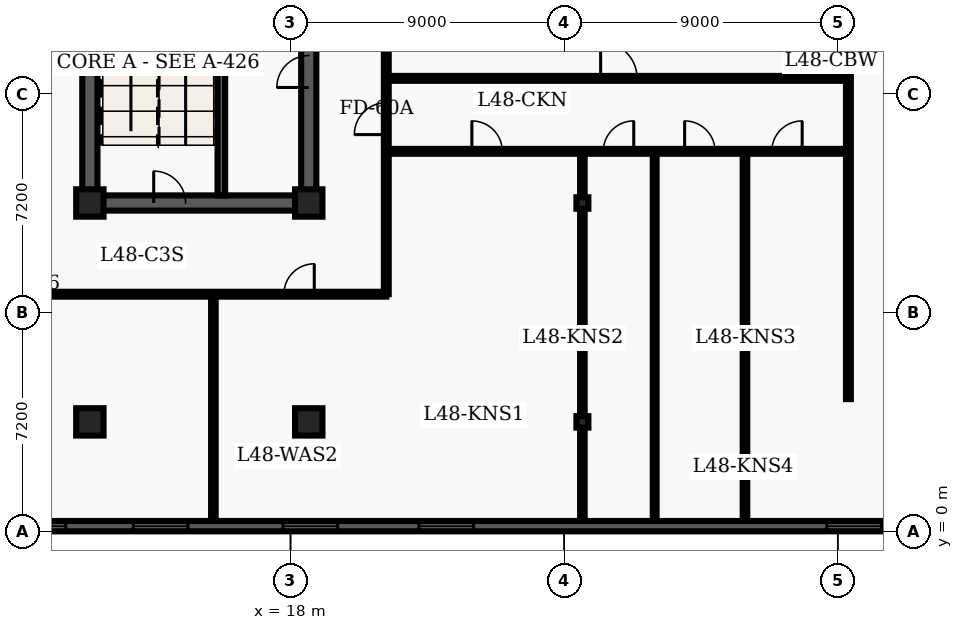
"""IFC4 building model, lengths in metres.
Left out: names, types, materials, properties, quantities, classifications, styles, units other than length and angle.
Written with IfcOpenShell. Run it as: python <this file> out.ifc"""

import sys

from ifc_helpers import new_model, entity, si_unit, converted_unit, direction, frame, origin_with_axes, origin_2d_with_axis, place, context, subcontext, project, spatial, polyline, rectangle, i_section, outline, extrude, element, fill, save


model = new_model("IFC4")
c1 = context("Model", 3, precision=1e-05, world=origin_with_axes(), true_north=direction((0.0, 1.0)))
c2 = subcontext(c1, "Body", "Model", "MODEL_VIEW")
j1 = project(units=[si_unit("LENGTHUNIT", "METRE"), converted_unit("PLANEANGLEUNIT", "DEGREE", entity("IfcPlaneAngleMeasure", 0.017), si_unit("PLANEANGLEUNIT", "RADIAN"), dimensions=[0, 0, 0, 0, 0, 0, 0])], contexts=[c1])
p1 = place(None, origin_with_axes())
s1 = spatial("IfcSite", under=j1, at=p1, CompositionType="ELEMENT")
p2 = place(p1, origin_with_axes())
s2 = spatial("IfcBuilding", under=s1, at=p2, CompositionType="ELEMENT")
p3 = place(p2, frame((0.0, 0.0, 196.5), z_axis=(0.0, 0.0, 1.0), x_axis=(1.0, 0.0, 0.0)))
s3 = spatial("IfcBuildingStorey", under=s2, at=p3, CompositionType="ELEMENT", Elevation=196.5)
p4 = place(p3, frame((11.4, 10.8, 0.0), z_axis=(0.0, 0.0, 1.0), x_axis=(0.0, 1.0, 0.0)))
e1 = element("IfcWall", 1, at=p4, inside=s3, PredefinedType="SHEAR", context=c2, shape_type="SweptSolid", body=[
    extrude(outline(polyline([(0.0, -0.25), (27.0, -0.25), (27.0, 0.25), (0.0, 0.25), (0.0, -0.25)])), origin_with_axes(), (0.0, 0.0, 1.0), 3.66),
])
p5 = place(p3, frame((11.4, 10.8, 0.0), z_axis=(0.0, 0.0, 1.0), x_axis=(1.0, 0.0, 0.0)))
e2 = element("IfcWall", 2, at=p5, inside=s3, PredefinedType="SHEAR", context=c2, shape_type="SweptSolid", body=[
    extrude(outline(polyline([(0.0, -0.25), (7.2, -0.25), (7.2, 0.25), (0.0, 0.25), (0.0, -0.25)])), origin_with_axes(), (0.0, 0.0, 1.0), 3.66),
])
p6 = place(p5, frame((2.625, 0.0, 0.0), z_axis=(0.0, 0.0, 1.0), x_axis=(1.0, 0.0, 0.0)))
e3 = element("IfcOpeningElement", 3, at=p6, cuts=e2, PredefinedType="OPENING", context=c2, shape_type="SweptSolid", body=[
    extrude(rectangle(XDim=1.05, YDim=0.52, at=origin_2d_with_axis()), origin_with_axes(), (0.0, 0.0, 1.0), 2.15),
])
p7 = place(p3, frame((18.6, 10.8, 0.0), z_axis=(0.0, 0.0, 1.0), x_axis=(0.0, 1.0, 0.0)))
e4 = element("IfcWall", 4, at=p7, inside=s3, PredefinedType="SHEAR", context=c2, shape_type="SweptSolid", body=[
    extrude(outline(polyline([(0.0, -0.25), (13.5, -0.25), (13.5, 0.25), (0.0, 0.25), (0.0, -0.25)])), origin_with_axes(), (0.0, 0.0, 1.0), 3.66),
])
p8 = place(p7, frame((11.125, 0.0, 0.0), z_axis=(0.0, 0.0, 1.0), x_axis=(1.0, 0.0, 0.0)))
e5 = element("IfcOpeningElement", 5, at=p8, cuts=e4, PredefinedType="OPENING", context=c2, shape_type="SweptSolid", body=[
    extrude(rectangle(XDim=1.05, YDim=0.52, at=origin_2d_with_axis()), origin_with_axes(), (0.0, 0.0, 1.0), 2.15),
])
p9 = place(p7, frame((4.325, 0.0, 0.0), z_axis=(0.0, 0.0, 1.0), x_axis=(1.0, 0.0, 0.0)))
e6 = element("IfcOpeningElement", 6, at=p9, cuts=e4, PredefinedType="OPENING", context=c2, shape_type="SweptSolid", body=[
    extrude(rectangle(XDim=1.05, YDim=0.52, at=origin_2d_with_axis()), origin_with_axes(), (0.0, 0.0, 1.0), 2.15),
])
p10 = place(p3, frame((15.725, 11.05, 0.0), z_axis=(0.0, 0.0, 1.0), x_axis=(0.0, 1.0, 0.0)))
e7 = element("IfcWall", 7, at=p10, inside=s3, PredefinedType="SHEAR", context=c2, shape_type="SweptSolid", body=[
    extrude(outline(polyline([(0.0, -0.125), (8.65, -0.125), (8.65, 0.125), (0.0, 0.125), (0.0, -0.125)])), origin_with_axes(), (0.0, 0.0, 1.0), 3.66),
])
for number, where, z_axis, x_axis in (
    (8, (11.4, 3.6, 0.0), (0.0, 0.0, 1.0), (1.0, 0.0, 0.0)),
    (9, (11.4, 10.8, 0.0), (0.0, 0.0, 1.0), (1.0, 0.0, 0.0)),
    (10, (18.6, 3.6, 0.0), (0.0, 0.0, 1.0), (1.0, 0.0, 0.0)),
    (11, (18.6, 10.8, 0.0), (0.0, 0.0, 1.0), (1.0, 0.0, 0.0)),
):
    element("IfcColumn", number, at=place(p3, frame(where, z_axis=z_axis, x_axis=x_axis)), inside=s3, PredefinedType="COLUMN", context=c2, shape_type="SweptSolid", body=[
        extrude(rectangle(XDim=0.9, YDim=0.9, at=origin_2d_with_axis()), origin_with_axes(), (0.0, 0.0, 1.0), 3.9),
    ])
for number, where, z_axis, x_axis in (
    (12, (27.6, 3.6, 0.0), (0.0, 0.0, 1.0), (1.0, 0.0, 0.0)),
    (13, (27.6, 10.8, 0.0), (0.0, 0.0, 1.0), (1.0, 0.0, 0.0)),
):
    element("IfcColumn", number, at=place(p3, frame(where, z_axis=z_axis, x_axis=x_axis)), inside=s3, PredefinedType="COLUMN", context=c2, shape_type="SweptSolid", body=[
        extrude(i_section(OverallWidth=0.394, OverallDepth=0.375, WebThickness=0.017, FlangeThickness=0.028, FilletRadius=0.02, at=origin_2d_with_axis()), origin_with_axes(), (0.0, 0.0, 1.0), 3.9),
    ])
p11 = place(p3, frame((2.6, 7.8, 0.0), z_axis=(0.0, 0.0, 1.0), x_axis=(1.0, 0.0, 0.0)))
e14 = element("IfcWall", 14, at=p11, inside=s3, PredefinedType="PARTITIONING", context=c2, shape_type="SweptSolid", body=[
    extrude(outline(polyline([(0.0, -0.08), (18.55, -0.08), (18.55, 0.08), (0.0, 0.08), (0.0, -0.08)])), origin_with_axes(), (0.0, 0.0, 1.0), 2.7),
])
p12 = place(p11, frame((6.426, 0.0, 0.0), z_axis=(0.0, 0.0, 1.0), x_axis=(1.0, 0.0, 0.0)))
e15 = element("IfcOpeningElement", 15, at=p12, cuts=e14, PredefinedType="OPENING", context=c2, shape_type="SweptSolid", body=[
    extrude(rectangle(XDim=1.2, YDim=0.18, at=origin_2d_with_axis()), origin_with_axes(), (0.0, 0.0, 1.0), 2.2),
])
p13 = place(p11, frame((15.681, 0.0, 0.0), z_axis=(0.0, 0.0, 1.0), x_axis=(1.0, 0.0, 0.0)))
e16 = element("IfcOpeningElement", 16, at=p13, cuts=e14, PredefinedType="OPENING", context=c2, shape_type="SweptSolid", body=[
    extrude(rectangle(XDim=1.0, YDim=0.18, at=origin_2d_with_axis()), origin_with_axes(), (0.0, 0.0, 1.0), 2.15),
])
p14 = place(p3, frame((21.15, 7.8, 0.0), z_axis=(0.0, 0.0, 1.0), x_axis=(0.0, 1.0, 0.0)))
e17 = element("IfcWall", 17, at=p14, inside=s3, PredefinedType="PARTITIONING", context=c2, shape_type="SweptSolid", body=[
    extrude(outline(polyline([(0.0, -0.08), (32.7, -0.08), (32.7, 0.08), (0.0, 0.08), (0.0, -0.08)])), origin_with_axes(), (0.0, 0.0, 1.0), 2.7),
])
p15 = place(p14, frame((16.235, 0.0, 0.0), z_axis=(0.0, 0.0, 1.0), x_axis=(1.0, 0.0, 0.0)))
e18 = element("IfcOpeningElement", 18, at=p15, cuts=e17, PredefinedType="OPENING", context=c2, shape_type="SweptSolid", body=[
    extrude(rectangle(XDim=1.0, YDim=0.18, at=origin_2d_with_axis()), origin_with_axes(), (0.0, 0.0, 1.0), 2.15),
])
p16 = place(p14, frame((20.023, 0.0, 0.0), z_axis=(0.0, 0.0, 1.0), x_axis=(1.0, 0.0, 0.0)))
e19 = element("IfcOpeningElement", 19, at=p16, cuts=e17, PredefinedType="OPENING", context=c2, shape_type="SweptSolid", body=[
    extrude(rectangle(XDim=1.0, YDim=0.18, at=origin_2d_with_axis()), origin_with_axes(), (0.0, 0.0, 1.0), 2.15),
])
p17 = place(p14, frame((23.135, 0.0, 0.0), z_axis=(0.0, 0.0, 1.0), x_axis=(1.0, 0.0, 0.0)))
e20 = element("IfcOpeningElement", 20, at=p17, cuts=e17, PredefinedType="OPENING", context=c2, shape_type="SweptSolid", body=[
    extrude(rectangle(XDim=1.0, YDim=0.18, at=origin_2d_with_axis()), origin_with_axes(), (0.0, 0.0, 1.0), 2.15),
])
p18 = place(p14, frame((26.594, 0.0, 0.0), z_axis=(0.0, 0.0, 1.0), x_axis=(1.0, 0.0, 0.0)))
e21 = element("IfcOpeningElement", 21, at=p18, cuts=e17, PredefinedType="OPENING", context=c2, shape_type="SweptSolid", body=[
    extrude(rectangle(XDim=1.0, YDim=0.18, at=origin_2d_with_axis()), origin_with_axes(), (0.0, 0.0, 1.0), 2.15),
])
p19 = place(p14, frame((30.498, 0.0, 0.0), z_axis=(0.0, 0.0, 1.0), x_axis=(1.0, 0.0, 0.0)))
e22 = element("IfcOpeningElement", 22, at=p19, cuts=e17, PredefinedType="OPENING", context=c2, shape_type="SweptSolid", body=[
    extrude(rectangle(XDim=1.0, YDim=0.18, at=origin_2d_with_axis()), origin_with_axes(), (0.0, 0.0, 1.0), 2.15),
])
p20 = place(p14, frame((5.775, 0.0, 0.0), z_axis=(0.0, 0.0, 1.0), x_axis=(1.0, 0.0, 0.0)))
e23 = element("IfcOpeningElement", 23, at=p20, cuts=e17, PredefinedType="OPENING", context=c2, shape_type="SweptSolid", body=[
    extrude(rectangle(XDim=1.05, YDim=0.18, at=origin_2d_with_axis()), origin_with_axes(), (0.0, 0.0, 1.0), 2.15),
])
p21 = place(p3, frame((15.463, 0.335, 0.0), z_axis=(0.0, 0.0, 1.0), x_axis=(0.0, 1.0, 0.0)))
e24 = element("IfcWall", 24, at=p21, inside=s3, PredefinedType="PARTITIONING", context=c2, shape_type="SweptSolid", body=[
    extrude(outline(polyline([(0.0, -0.075), (7.365, -0.075), (7.365, 0.075), (0.0, 0.075), (0.0, -0.075)])), origin_with_axes(), (0.0, 0.0, 1.0), 2.7),
])
p22 = place(p3, frame((21.15, 12.5, 0.0), z_axis=(0.0, 0.0, 1.0), x_axis=(1.0, 0.0, 0.0)))
e25 = element("IfcWall", 25, at=p22, inside=s3, PredefinedType="PARTITIONING", context=c2, shape_type="SweptSolid", body=[
    extrude(outline(polyline([(0.0, -0.08), (15.2, -0.08), (15.2, 0.08), (0.0, 0.08), (0.0, -0.08)])), origin_with_axes(), (0.0, 0.0, 1.0), 2.7),
])
p23 = place(p22, frame((3.315, 0.0, 0.0), z_axis=(0.0, 0.0, 1.0), x_axis=(1.0, 0.0, 0.0)))
e26 = element("IfcOpeningElement", 26, at=p23, cuts=e25, PredefinedType="OPENING", context=c2, shape_type="SweptSolid", body=[
    extrude(rectangle(XDim=1.0, YDim=0.18, at=origin_2d_with_axis()), origin_with_axes(), (0.0, 0.0, 1.0), 2.15),
])
p24 = place(p22, frame((7.639, 0.0, 0.0), z_axis=(0.0, 0.0, 1.0), x_axis=(1.0, 0.0, 0.0)))
e27 = element("IfcOpeningElement", 27, at=p24, cuts=e25, PredefinedType="OPENING", context=c2, shape_type="SweptSolid", body=[
    extrude(rectangle(XDim=1.0, YDim=0.18, at=origin_2d_with_axis()), origin_with_axes(), (0.0, 0.0, 1.0), 2.15),
])
p25 = place(p22, frame((10.313, 0.0, 0.0), z_axis=(0.0, 0.0, 1.0), x_axis=(1.0, 0.0, 0.0)))
e28 = element("IfcOpeningElement", 28, at=p25, cuts=e25, PredefinedType="OPENING", context=c2, shape_type="SweptSolid", body=[
    extrude(rectangle(XDim=1.0, YDim=0.18, at=origin_2d_with_axis()), origin_with_axes(), (0.0, 0.0, 1.0), 2.15),
])
p26 = place(p22, frame((13.179, 0.0, 0.0), z_axis=(0.0, 0.0, 1.0), x_axis=(1.0, 0.0, 0.0)))
e29 = element("IfcOpeningElement", 29, at=p26, cuts=e25, PredefinedType="OPENING", context=c2, shape_type="SweptSolid", body=[
    extrude(rectangle(XDim=1.0, YDim=0.18, at=origin_2d_with_axis()), origin_with_axes(), (0.0, 0.0, 1.0), 2.15),
])
p27 = place(p3, frame((21.15, 14.9, 0.0), z_axis=(0.0, 0.0, 1.0), x_axis=(1.0, 0.0, 0.0)))
e30 = element("IfcWall", 30, at=p27, inside=s3, PredefinedType="PARTITIONING", context=c2, shape_type="SweptSolid", body=[
    extrude(outline(polyline([(0.0, -0.08), (15.2, -0.08), (15.2, 0.08), (0.0, 0.08), (0.0, -0.08)])), origin_with_axes(), (0.0, 0.0, 1.0), 2.7),
])
p28 = place(p27, frame((7.65, 0.0, 0.0), z_axis=(0.0, 0.0, 1.0), x_axis=(1.0, 0.0, 0.0)))
e31 = element("IfcOpeningElement", 31, at=p28, cuts=e30, PredefinedType="OPENING", context=c2, shape_type="SweptSolid", body=[
    extrude(rectangle(XDim=1.2, YDim=0.18, at=origin_2d_with_axis()), origin_with_axes(), (0.0, 0.0, 1.0), 2.2),
])
p29 = place(p3, frame((36.35, 4.35, 0.0), z_axis=(0.0, 0.0, 1.0), x_axis=(0.0, 1.0, 0.0)))
e32 = element("IfcWall", 32, at=p29, inside=s3, PredefinedType="PARTITIONING", context=c2, shape_type="SweptSolid", body=[
    extrude(outline(polyline([(0.0, -0.08), (16.95, -0.08), (16.95, 0.08), (0.0, 0.08), (0.0, -0.08)])), origin_with_axes(), (0.0, 0.0, 1.0), 2.7),
])
p30 = place(p3, frame((27.6, 0.335, 0.0), z_axis=(0.0, 0.0, 1.0), x_axis=(0.0, 1.0, 0.0)))
e33 = element("IfcWall", 33, at=p30, inside=s3, PredefinedType="PARTITIONING", context=c2, shape_type="SweptSolid", body=[
    extrude(outline(polyline([(0.0, -0.075), (12.045, -0.075), (12.045, 0.075), (0.0, 0.075), (0.0, -0.075)])), origin_with_axes(), (0.0, 0.0, 1.0), 2.7),
])
p31 = place(p3, frame((29.978, 0.335, 0.0), z_axis=(0.0, 0.0, 1.0), x_axis=(0.0, 1.0, 0.0)))
e34 = element("IfcWall", 34, at=p31, inside=s3, PredefinedType="PARTITIONING", context=c2, shape_type="SweptSolid", body=[
    extrude(outline(polyline([(0.0, -0.062), (12.045, -0.062), (12.045, 0.062), (0.0, 0.062), (0.0, -0.062)])), origin_with_axes(), (0.0, 0.0, 1.0), 2.7),
])
p32 = place(p3, frame((32.948, 0.335, 0.0), z_axis=(0.0, 0.0, 1.0), x_axis=(0.0, 1.0, 0.0)))
e35 = element("IfcWall", 35, at=p32, inside=s3, PredefinedType="PARTITIONING", context=c2, shape_type="SweptSolid", body=[
    extrude(outline(polyline([(0.0, -0.075), (12.045, -0.075), (12.045, 0.075), (0.0, 0.075), (0.0, -0.075)])), origin_with_axes(), (0.0, 0.0, 1.0), 2.7),
])
p33 = place(p3, frame((57.26, 0.17, 0.0), z_axis=(0.0, 0.0, 1.0), x_axis=(-1.0, 0.0, 0.0)))
e36 = element("IfcWall", 36, at=p33, inside=s3, PredefinedType="SOLIDWALL", context=c2, shape_type="SweptSolid", body=[
    extrude(outline(polyline([(0.0, -0.17), (54.86, -0.17), (54.86, 0.17), (0.0, 0.17), (0.0, -0.17)])), origin_with_axes(), (0.0, 0.0, 1.0), 3.66),
])
p34 = place(p33, frame((2.836, 0.0, 0.45), z_axis=(0.0, 0.0, 1.0), x_axis=(1.0, 0.0, 0.0)))
e37 = element("IfcOpeningElement", 37, at=p34, cuts=e36, PredefinedType="OPENING", context=c2, shape_type="SweptSolid", body=[
    extrude(rectangle(XDim=1.8, YDim=0.36, at=origin_2d_with_axis()), origin_with_axes(), (0.0, 0.0, 1.0), 2.1),
])
p35 = place(p33, frame((7.307, 0.0, 0.45), z_axis=(0.0, 0.0, 1.0), x_axis=(1.0, 0.0, 0.0)))
e38 = element("IfcOpeningElement", 38, at=p35, cuts=e36, PredefinedType="OPENING", context=c2, shape_type="SweptSolid", body=[
    extrude(rectangle(XDim=1.8, YDim=0.36, at=origin_2d_with_axis()), origin_with_axes(), (0.0, 0.0, 1.0), 2.1),
])
p36 = place(p33, frame((11.779, 0.0, 0.45), z_axis=(0.0, 0.0, 1.0), x_axis=(1.0, 0.0, 0.0)))
e39 = element("IfcOpeningElement", 39, at=p36, cuts=e36, PredefinedType="OPENING", context=c2, shape_type="SweptSolid", body=[
    extrude(rectangle(XDim=1.8, YDim=0.36, at=origin_2d_with_axis()), origin_with_axes(), (0.0, 0.0, 1.0), 2.1),
])
p37 = place(p33, frame((16.251, 0.0, 0.45), z_axis=(0.0, 0.0, 1.0), x_axis=(1.0, 0.0, 0.0)))
e40 = element("IfcOpeningElement", 40, at=p37, cuts=e36, PredefinedType="OPENING", context=c2, shape_type="SweptSolid", body=[
    extrude(rectangle(XDim=1.8, YDim=0.36, at=origin_2d_with_axis()), origin_with_axes(), (0.0, 0.0, 1.0), 2.1),
])
p38 = place(p33, frame((20.723, 0.0, 0.45), z_axis=(0.0, 0.0, 1.0), x_axis=(1.0, 0.0, 0.0)))
e41 = element("IfcOpeningElement", 41, at=p38, cuts=e36, PredefinedType="OPENING", context=c2, shape_type="SweptSolid", body=[
    extrude(rectangle(XDim=1.8, YDim=0.36, at=origin_2d_with_axis()), origin_with_axes(), (0.0, 0.0, 1.0), 2.1),
])
p39 = place(p33, frame((34.138, 0.0, 0.45), z_axis=(0.0, 0.0, 1.0), x_axis=(1.0, 0.0, 0.0)))
e42 = element("IfcOpeningElement", 42, at=p39, cuts=e36, PredefinedType="OPENING", context=c2, shape_type="SweptSolid", body=[
    extrude(rectangle(XDim=1.8, YDim=0.36, at=origin_2d_with_axis()), origin_with_axes(), (0.0, 0.0, 1.0), 2.1),
])
p40 = place(p33, frame((38.609, 0.0, 0.45), z_axis=(0.0, 0.0, 1.0), x_axis=(1.0, 0.0, 0.0)))
e43 = element("IfcOpeningElement", 43, at=p40, cuts=e36, PredefinedType="OPENING", context=c2, shape_type="SweptSolid", body=[
    extrude(rectangle(XDim=1.8, YDim=0.36, at=origin_2d_with_axis()), origin_with_axes(), (0.0, 0.0, 1.0), 2.1),
])
p41 = place(p33, frame((43.531, 0.0, 0.45), z_axis=(0.0, 0.0, 1.0), x_axis=(1.0, 0.0, 0.0)))
e44 = element("IfcOpeningElement", 44, at=p41, cuts=e36, PredefinedType="OPENING", context=c2, shape_type="SweptSolid", body=[
    extrude(rectangle(XDim=1.8, YDim=0.36, at=origin_2d_with_axis()), origin_with_axes(), (0.0, 0.0, 1.0), 2.1),
])
p42 = place(p33, frame((47.553, 0.0, 0.45), z_axis=(0.0, 0.0, 1.0), x_axis=(1.0, 0.0, 0.0)))
e45 = element("IfcOpeningElement", 45, at=p42, cuts=e36, PredefinedType="OPENING", context=c2, shape_type="SweptSolid", body=[
    extrude(rectangle(XDim=1.8, YDim=0.36, at=origin_2d_with_axis()), origin_with_axes(), (0.0, 0.0, 1.0), 2.1),
])
p43 = place(p33, frame((52.024, 0.0, 0.45), z_axis=(0.0, 0.0, 1.0), x_axis=(1.0, 0.0, 0.0)))
e46 = element("IfcOpeningElement", 46, at=p43, cuts=e36, PredefinedType="OPENING", context=c2, shape_type="SweptSolid", body=[
    extrude(rectangle(XDim=1.8, YDim=0.36, at=origin_2d_with_axis()), origin_with_axes(), (0.0, 0.0, 1.0), 2.1),
])
p44 = place(p5, frame((2.625, 0.0, 0.0), z_axis=(0.0, 0.0, 1.0), x_axis=(1.0, 0.0, 0.0)))
e47 = element("IfcDoor", 47, at=p44, inside=s3, OperationType="SINGLE_SWING_LEFT", PredefinedType="DOOR", context=c2, shape_type="SweptSolid", body=[
    extrude(rectangle(XDim=1.05, YDim=0.09, at=origin_2d_with_axis()), origin_with_axes(), (0.0, 0.0, 1.0), 2.15),
])
fill(e3, e47)
p45 = place(p7, frame((4.325, 0.0, 0.0), z_axis=(0.0, 0.0, 1.0), x_axis=(1.0, 0.0, 0.0)))
e48 = element("IfcDoor", 48, at=p45, inside=s3, OperationType="SINGLE_SWING_LEFT", PredefinedType="DOOR", context=c2, shape_type="SweptSolid", body=[
    extrude(rectangle(XDim=1.05, YDim=0.09, at=origin_2d_with_axis()), origin_with_axes(), (0.0, 0.0, 1.0), 2.15),
])
fill(e6, e48)
p46 = place(p11, frame((15.681, 0.0, 0.0), z_axis=(0.0, 0.0, 1.0), x_axis=(1.0, 0.0, 0.0)))
e49 = element("IfcDoor", 49, at=p46, inside=s3, OperationType="SINGLE_SWING_RIGHT", PredefinedType="DOOR", context=c2, shape_type="SweptSolid", body=[
    extrude(rectangle(XDim=1.0, YDim=0.09, at=origin_2d_with_axis()), origin_with_axes(), (0.0, 0.0, 1.0), 2.15),
])
fill(e16, e49)
p47 = place(p14, frame((5.775, 0.0, 0.0), z_axis=(0.0, 0.0, 1.0), x_axis=(1.0, 0.0, 0.0)))
e50 = element("IfcDoor", 50, at=p47, inside=s3, OperationType="SINGLE_SWING_LEFT", PredefinedType="DOOR", context=c2, shape_type="SweptSolid", body=[
    extrude(rectangle(XDim=1.05, YDim=0.09, at=origin_2d_with_axis()), origin_with_axes(), (0.0, 0.0, 1.0), 2.15),
])
fill(e23, e50)
p48 = place(p22, frame((3.315, 0.0, 0.0), z_axis=(0.0, 0.0, 1.0), x_axis=(1.0, 0.0, 0.0)))
e51 = element("IfcDoor", 51, at=p48, inside=s3, OperationType="SINGLE_SWING_LEFT", PredefinedType="DOOR", context=c2, shape_type="SweptSolid", body=[
    extrude(rectangle(XDim=1.0, YDim=0.09, at=origin_2d_with_axis()), origin_with_axes(), (0.0, 0.0, 1.0), 2.15),
])
fill(e26, e51)
p49 = place(p22, frame((7.639, 0.0, 0.0), z_axis=(0.0, 0.0, 1.0), x_axis=(1.0, 0.0, 0.0)))
e52 = element("IfcDoor", 52, at=p49, inside=s3, OperationType="SINGLE_SWING_RIGHT", PredefinedType="DOOR", context=c2, shape_type="SweptSolid", body=[
    extrude(rectangle(XDim=1.0, YDim=0.09, at=origin_2d_with_axis()), origin_with_axes(), (0.0, 0.0, 1.0), 2.15),
])
fill(e27, e52)
p50 = place(p22, frame((10.313, 0.0, 0.0), z_axis=(0.0, 0.0, 1.0), x_axis=(1.0, 0.0, 0.0)))
e53 = element("IfcDoor", 53, at=p50, inside=s3, OperationType="SINGLE_SWING_LEFT", PredefinedType="DOOR", context=c2, shape_type="SweptSolid", body=[
    extrude(rectangle(XDim=1.0, YDim=0.09, at=origin_2d_with_axis()), origin_with_axes(), (0.0, 0.0, 1.0), 2.15),
])
fill(e28, e53)
p51 = place(p22, frame((13.179, 0.0, 0.0), z_axis=(0.0, 0.0, 1.0), x_axis=(1.0, 0.0, 0.0)))
e54 = element("IfcDoor", 54, at=p51, inside=s3, OperationType="SINGLE_SWING_RIGHT", PredefinedType="DOOR", context=c2, shape_type="SweptSolid", body=[
    extrude(rectangle(XDim=1.0, YDim=0.09, at=origin_2d_with_axis()), origin_with_axes(), (0.0, 0.0, 1.0), 2.15),
])
fill(e29, e54)
p52 = place(p27, frame((7.65, 0.0, 0.0), z_axis=(0.0, 0.0, 1.0), x_axis=(1.0, 0.0, 0.0)))
e55 = element("IfcDoor", 55, at=p52, inside=s3, OperationType="SINGLE_SWING_LEFT", PredefinedType="DOOR", context=c2, shape_type="SweptSolid", body=[
    extrude(rectangle(XDim=1.2, YDim=0.09, at=origin_2d_with_axis()), origin_with_axes(), (0.0, 0.0, 1.0), 2.2),
])
fill(e31, e55)
p53 = place(p33, frame((20.723, 0.0, 0.45), z_axis=(0.0, 0.0, 1.0), x_axis=(1.0, 0.0, 0.0)))
e56 = element("IfcWindow", 56, at=p53, inside=s3, PredefinedType="WINDOW", context=c2, shape_type="SweptSolid", body=[
    extrude(rectangle(XDim=1.8, YDim=0.09, at=origin_2d_with_axis()), origin_with_axes(), (0.0, 0.0, 1.0), 2.1),
])
fill(e41, e56)
p54 = place(p33, frame((34.138, 0.0, 0.45), z_axis=(0.0, 0.0, 1.0), x_axis=(1.0, 0.0, 0.0)))
e57 = element("IfcWindow", 57, at=p54, inside=s3, PredefinedType="WINDOW", context=c2, shape_type="SweptSolid", body=[
    extrude(rectangle(XDim=1.8, YDim=0.09, at=origin_2d_with_axis()), origin_with_axes(), (0.0, 0.0, 1.0), 2.1),
])
fill(e42, e57)
p55 = place(p33, frame((38.609, 0.0, 0.45), z_axis=(0.0, 0.0, 1.0), x_axis=(1.0, 0.0, 0.0)))
e58 = element("IfcWindow", 58, at=p55, inside=s3, PredefinedType="WINDOW", context=c2, shape_type="SweptSolid", body=[
    extrude(rectangle(XDim=1.8, YDim=0.09, at=origin_2d_with_axis()), origin_with_axes(), (0.0, 0.0, 1.0), 2.1),
])
fill(e43, e58)
p56 = place(p33, frame((43.531, 0.0, 0.45), z_axis=(0.0, 0.0, 1.0), x_axis=(1.0, 0.0, 0.0)))
e59 = element("IfcWindow", 59, at=p56, inside=s3, PredefinedType="WINDOW", context=c2, shape_type="SweptSolid", body=[
    extrude(rectangle(XDim=1.8, YDim=0.09, at=origin_2d_with_axis()), origin_with_axes(), (0.0, 0.0, 1.0), 2.1),
])
fill(e44, e59)
p57 = place(p33, frame((47.553, 0.0, 0.45), z_axis=(0.0, 0.0, 1.0), x_axis=(1.0, 0.0, 0.0)))
e60 = element("IfcWindow", 60, at=p57, inside=s3, PredefinedType="WINDOW", context=c2, shape_type="SweptSolid", body=[
    extrude(rectangle(XDim=1.8, YDim=0.09, at=origin_2d_with_axis()), origin_with_axes(), (0.0, 0.0, 1.0), 2.1),
])
fill(e45, e60)
save(model, sys.argv[1])
